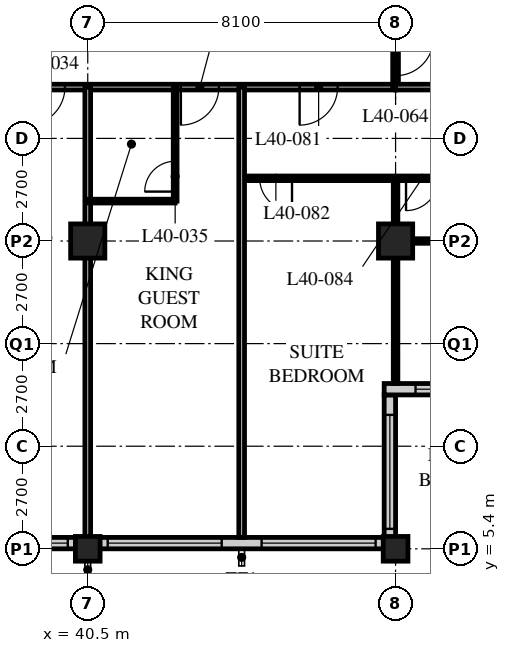
"""IFC4 building model, lengths in metres.
Left out: names, types, materials, properties, quantities, classifications, styles, units other than length and angle.
Written with IfcOpenShell. Run it as: python <this file> out.ifc"""

import sys

from ifc_helpers import new_model, si_unit, direction, frame, frame_2d, origin, origin_2d, place, context, subcontext, project, spatial, rectangle, hollow_rectangle, extrude, element, fill, save


model = new_model("IFC4")
c1 = context("Model", 3, precision=1e-05, world=origin(), true_north=direction((0.0, 1.0)))
c2 = subcontext(c1, "Body", "Model", "MODEL_VIEW")
j1 = project(units=[si_unit("LENGTHUNIT", "METRE"), si_unit("PLANEANGLEUNIT", "RADIAN")], contexts=[c1])
p1 = place(None, origin())
s1 = spatial("IfcSite", under=j1, at=p1, CompositionType="ELEMENT")
p2 = place(p1, origin())
s2 = spatial("IfcBuilding", under=s1, at=p2, CompositionType="ELEMENT")
p3 = place(p2, frame((0.0, 0.0, 154.4)))
s3 = spatial("IfcBuildingStorey", under=s2, at=p3, CompositionType="ELEMENT", Elevation=154.4)
p4 = place(p3, frame((40.5, 5.4, 0.0), z_axis=(0.0, 0.0, 1.0), x_axis=(1.0, 0.0, 0.0)))
e1 = element("IfcColumn", 1, at=p4, inside=s3, PredefinedType="COLUMN", context=c2, shape_type="SweptSolid", body=[
    extrude(hollow_rectangle(XDim=0.65, YDim=0.65, WallThickness=0.055, at=origin_2d()), origin(), (0.0, 0.0, 1.0), 3.4),
])
p5 = place(p3, frame((40.5, 13.5, 0.0), z_axis=(0.0, 0.0, 1.0), x_axis=(1.0, 0.0, 0.0)))
e2 = element("IfcColumn", 2, at=p5, inside=s3, PredefinedType="COLUMN", context=c2, shape_type="SweptSolid", body=[
    extrude(hollow_rectangle(XDim=0.9, YDim=0.9, WallThickness=0.1, at=origin_2d()), origin(), (0.0, 0.0, 1.0), 3.4),
])
p6 = place(p3, frame((48.6, 5.4, 0.0), z_axis=(0.0, 0.0, 1.0), x_axis=(1.0, 0.0, 0.0)))
e3 = element("IfcColumn", 3, at=p6, inside=s3, PredefinedType="COLUMN", context=c2, shape_type="SweptSolid", body=[
    extrude(hollow_rectangle(XDim=0.65, YDim=0.65, WallThickness=0.055, at=origin_2d()), origin(), (0.0, 0.0, 1.0), 3.4),
])
p7 = place(p3, frame((48.6, 13.5, 0.0), z_axis=(0.0, 0.0, 1.0), x_axis=(1.0, 0.0, 0.0)))
e4 = element("IfcColumn", 4, at=p7, inside=s3, PredefinedType="COLUMN", context=c2, shape_type="SweptSolid", body=[
    extrude(hollow_rectangle(XDim=0.9, YDim=0.9, WallThickness=0.1, at=origin_2d()), origin(), (0.0, 0.0, 1.0), 3.4),
])
p8 = place(p3, frame((8.4, 5.55, 0.0), z_axis=(0.0, 0.0, 1.0), x_axis=(1.0, 0.0, 0.0)))
e5 = element("IfcWall", 5, at=p8, inside=s3, PredefinedType="SOLIDWALL", context=c2, shape_type="SweptSolid", body=[
    extrude(rectangle(XDim=40.2, YDim=0.3, at=frame_2d((20.1, 0.0))), origin(), (0.0, 0.0, 1.0), 2.15),
])
p9 = place(p8, frame((0.225, 0.0, 0.9)))
e6 = element("IfcOpeningElement", 6, at=p9, cuts=e5, PredefinedType="OPENING", context=c2, shape_type="SweptSolid", body=[
    extrude(rectangle(XDim=3.0, YDim=1.2, at=frame_2d((1.5, 0.6))), frame((0.0, 0.16, 0.0), z_axis=(0.0, -1.0, 0.0), x_axis=(1.0, 0.0, 0.0)), (0.0, 0.0, 1.0), 0.32),
])
p10 = place(p8, frame((4.275, 0.0, 0.9)))
e7 = element("IfcOpeningElement", 7, at=p10, cuts=e5, PredefinedType="OPENING", context=c2, shape_type="SweptSolid", body=[
    extrude(rectangle(XDim=3.0, YDim=1.2, at=frame_2d((1.5, 0.6))), frame((0.0, 0.16, 0.0), z_axis=(0.0, -1.0, 0.0), x_axis=(1.0, 0.0, 0.0)), (0.0, 0.0, 1.0), 0.32),
])
p11 = place(p8, frame((8.325, 0.0, 0.9)))
e8 = element("IfcOpeningElement", 8, at=p11, cuts=e5, PredefinedType="OPENING", context=c2, shape_type="SweptSolid", body=[
    extrude(rectangle(XDim=3.0, YDim=1.2, at=frame_2d((1.5, 0.6))), frame((0.0, 0.16, 0.0), z_axis=(0.0, -1.0, 0.0), x_axis=(1.0, 0.0, 0.0)), (0.0, 0.0, 1.0), 0.32),
])
p12 = place(p8, frame((12.375, 0.0, 0.9)))
e9 = element("IfcOpeningElement", 9, at=p12, cuts=e5, PredefinedType="OPENING", context=c2, shape_type="SweptSolid", body=[
    extrude(rectangle(XDim=3.0, YDim=1.2, at=frame_2d((1.5, 0.6))), frame((0.0, 0.16, 0.0), z_axis=(0.0, -1.0, 0.0), x_axis=(1.0, 0.0, 0.0)), (0.0, 0.0, 1.0), 0.32),
])
p13 = place(p8, frame((16.425, 0.0, 0.9)))
e10 = element("IfcOpeningElement", 10, at=p13, cuts=e5, PredefinedType="OPENING", context=c2, shape_type="SweptSolid", body=[
    extrude(rectangle(XDim=3.0, YDim=1.2, at=frame_2d((1.5, 0.6))), frame((0.0, 0.16, 0.0), z_axis=(0.0, -1.0, 0.0), x_axis=(1.0, 0.0, 0.0)), (0.0, 0.0, 1.0), 0.32),
])
p14 = place(p8, frame((20.475, 0.0, 0.9)))
e11 = element("IfcOpeningElement", 11, at=p14, cuts=e5, PredefinedType="OPENING", context=c2, shape_type="SweptSolid", body=[
    extrude(rectangle(XDim=3.0, YDim=1.2, at=frame_2d((1.5, 0.6))), frame((0.0, 0.16, 0.0), z_axis=(0.0, -1.0, 0.0), x_axis=(1.0, 0.0, 0.0)), (0.0, 0.0, 1.0), 0.32),
])
p15 = place(p8, frame((24.525, 0.0, 0.9)))
e12 = element("IfcOpeningElement", 12, at=p15, cuts=e5, PredefinedType="OPENING", context=c2, shape_type="SweptSolid", body=[
    extrude(rectangle(XDim=3.0, YDim=1.2, at=frame_2d((1.5, 0.6))), frame((0.0, 0.16, 0.0), z_axis=(0.0, -1.0, 0.0), x_axis=(1.0, 0.0, 0.0)), (0.0, 0.0, 1.0), 0.32),
])
p16 = place(p8, frame((28.575, 0.0, 0.9)))
e13 = element("IfcOpeningElement", 13, at=p16, cuts=e5, PredefinedType="OPENING", context=c2, shape_type="SweptSolid", body=[
    extrude(rectangle(XDim=3.0, YDim=1.2, at=frame_2d((1.5, 0.6))), frame((0.0, 0.16, 0.0), z_axis=(0.0, -1.0, 0.0), x_axis=(1.0, 0.0, 0.0)), (0.0, 0.0, 1.0), 0.32),
])
p17 = place(p8, frame((32.625, 0.0, 0.9)))
e14 = element("IfcOpeningElement", 14, at=p17, cuts=e5, PredefinedType="OPENING", context=c2, shape_type="SweptSolid", body=[
    extrude(rectangle(XDim=3.0, YDim=1.2, at=frame_2d((1.5, 0.6))), frame((0.0, 0.16, 0.0), z_axis=(0.0, -1.0, 0.0), x_axis=(1.0, 0.0, 0.0)), (0.0, 0.0, 1.0), 0.32),
])
p18 = place(p8, frame((36.675, 0.0, 0.9)))
e15 = element("IfcOpeningElement", 15, at=p18, cuts=e5, PredefinedType="OPENING", context=c2, shape_type="SweptSolid", body=[
    extrude(rectangle(XDim=3.0, YDim=1.2, at=frame_2d((1.5, 0.6))), frame((0.0, 0.16, 0.0), z_axis=(0.0, -1.0, 0.0), x_axis=(1.0, 0.0, 0.0)), (0.0, 0.0, 1.0), 0.32),
])
p19 = place(p3, frame((48.45, 5.7, 0.0), z_axis=(0.0, 0.0, 1.0), x_axis=(0.0, 1.0, 0.0)))
e16 = element("IfcWall", 16, at=p19, inside=s3, PredefinedType="SOLIDWALL", context=c2, shape_type="SweptSolid", body=[
    extrude(rectangle(XDim=3.75, YDim=0.3, at=frame_2d((1.875, 0.0))), origin(), (0.0, 0.0, 1.0), 2.15),
])
p20 = place(p19, frame((0.225, 0.0, 0.9)))
e17 = element("IfcOpeningElement", 17, at=p20, cuts=e16, PredefinedType="OPENING", context=c2, shape_type="SweptSolid", body=[
    extrude(rectangle(XDim=3.0, YDim=1.2, at=frame_2d((1.5, 0.6))), frame((0.0, 0.16, 0.0), z_axis=(0.0, -1.0, 0.0), x_axis=(1.0, 0.0, 0.0)), (0.0, 0.0, 1.0), 0.32),
])
p21 = place(p3, frame((48.3, 9.6, 0.0), z_axis=(0.0, 0.0, 1.0), x_axis=(1.0, 0.0, 0.0)))
e18 = element("IfcWall", 18, at=p21, inside=s3, PredefinedType="SOLIDWALL", context=c2, shape_type="SweptSolid", body=[
    extrude(rectangle(XDim=4.35, YDim=0.3, at=frame_2d((2.175, 0.0))), origin(), (0.0, 0.0, 1.0), 2.45),
])
p22 = place(p21, frame((0.825, 0.0, 0.9)))
e19 = element("IfcOpeningElement", 19, at=p22, cuts=e18, PredefinedType="OPENING", context=c2, shape_type="SweptSolid", body=[
    extrude(rectangle(XDim=3.0, YDim=1.2, at=frame_2d((1.5, 0.6))), frame((0.0, 0.16, 0.0), z_axis=(0.0, -1.0, 0.0), x_axis=(1.0, 0.0, 0.0)), (0.0, 0.0, 1.0), 0.32),
])
p23 = place(p3, frame((8.1, 17.55, 0.0), z_axis=(0.0, 0.0, 1.0), x_axis=(1.0, 0.0, 0.0)))
e20 = element("IfcWall", 20, at=p23, inside=s3, PredefinedType="PARTITIONING", context=c2, shape_type="SweptSolid", body=[
    extrude(rectangle(XDim=40.5, YDim=0.15, at=frame_2d((20.25, 0.0))), origin(), (0.0, 0.0, 1.0), 3.15),
])
p24 = place(p23, frame((10.0, 0.0, 0.0)))
e21 = element("IfcOpeningElement", 21, at=p24, cuts=e20, PredefinedType="OPENING", context=c2, shape_type="SweptSolid", body=[
    extrude(rectangle(XDim=1.0, YDim=2.1, at=frame_2d((0.5, 1.05))), frame((0.0, 0.085, 0.0), z_axis=(0.0, -1.0, 0.0), x_axis=(1.0, 0.0, 0.0)), (0.0, 0.0, 1.0), 0.17),
])
p25 = place(p23, frame((22.15, 0.0, 0.0)))
e22 = element("IfcOpeningElement", 22, at=p25, cuts=e20, PredefinedType="OPENING", context=c2, shape_type="SweptSolid", body=[
    extrude(rectangle(XDim=1.0, YDim=2.1, at=frame_2d((0.5, 1.05))), frame((0.0, 0.085, 0.0), z_axis=(0.0, -1.0, 0.0), x_axis=(1.0, 0.0, 0.0)), (0.0, 0.0, 1.0), 0.17),
])
p26 = place(p23, frame((30.8, 0.0, 0.0)))
e23 = element("IfcOpeningElement", 23, at=p26, cuts=e20, PredefinedType="OPENING", context=c2, shape_type="SweptSolid", body=[
    extrude(rectangle(XDim=1.0, YDim=2.1, at=frame_2d((0.5, 1.05))), frame((0.0, 0.085, 0.0), z_axis=(0.0, -1.0, 0.0), x_axis=(1.0, 0.0, 0.0)), (0.0, 0.0, 1.0), 0.17),
])
p27 = place(p23, frame((34.85, 0.0, 0.0)))
e24 = element("IfcOpeningElement", 24, at=p27, cuts=e20, PredefinedType="OPENING", context=c2, shape_type="SweptSolid", body=[
    extrude(rectangle(XDim=1.0, YDim=2.1, at=frame_2d((0.5, 1.05))), frame((0.0, 0.085, 0.0), z_axis=(0.0, -1.0, 0.0), x_axis=(1.0, 0.0, 0.0)), (0.0, 0.0, 1.0), 0.17),
])
p28 = place(p23, frame((1.525, 0.0, 0.0)))
e25 = element("IfcOpeningElement", 25, at=p28, cuts=e20, PredefinedType="OPENING", context=c2, shape_type="SweptSolid", body=[
    extrude(rectangle(XDim=1.0, YDim=2.1, at=frame_2d((0.5, 1.05))), frame((0.0, 0.085, 0.0), z_axis=(0.0, -1.0, 0.0), x_axis=(1.0, 0.0, 0.0)), (0.0, 0.0, 1.0), 0.17),
])
p29 = place(p23, frame((37.975, 0.0, 0.0)))
e26 = element("IfcOpeningElement", 26, at=p29, cuts=e20, PredefinedType="OPENING", context=c2, shape_type="SweptSolid", body=[
    extrude(rectangle(XDim=1.0, YDim=2.1, at=frame_2d((0.5, 1.05))), frame((0.0, 0.085, 0.0), z_axis=(0.0, -1.0, 0.0), x_axis=(1.0, 0.0, 0.0)), (0.0, 0.0, 1.0), 0.17),
])
p30 = place(p3, frame((48.6, 17.55, 0.0), z_axis=(0.0, 0.0, 1.0), x_axis=(0.0, 1.0, 0.0)))
e27 = element("IfcWall", 27, at=p30, inside=s3, PredefinedType="PARTITIONING", context=c2, shape_type="SweptSolid", body=[
    extrude(rectangle(XDim=28.35, YDim=0.15, at=frame_2d((14.175, 0.0))), origin(), (0.0, 0.0, 1.0), 2.15),
])
p31 = place(p30, frame((0.3, 0.0, 0.0)))
e28 = element("IfcOpeningElement", 28, at=p31, cuts=e27, PredefinedType="OPENING", context=c2, shape_type="SweptSolid", body=[
    extrude(rectangle(XDim=1.0, YDim=2.1, at=frame_2d((0.5, 1.05))), frame((0.0, 0.085, 0.0), z_axis=(0.0, -1.0, 0.0), x_axis=(1.0, 0.0, 0.0)), (0.0, 0.0, 1.0), 0.17),
])
p32 = place(p30, frame((6.5, 0.0, 0.0)))
e29 = element("IfcOpeningElement", 29, at=p32, cuts=e27, PredefinedType="OPENING", context=c2, shape_type="SweptSolid", body=[
    extrude(rectangle(XDim=1.0, YDim=2.1, at=frame_2d((0.5, 1.05))), frame((0.0, 0.085, 0.0), z_axis=(0.0, -1.0, 0.0), x_axis=(1.0, 0.0, 0.0)), (0.0, 0.0, 1.0), 0.17),
])
p33 = place(p30, frame((13.675, 0.0, 0.0)))
e30 = element("IfcOpeningElement", 30, at=p33, cuts=e27, PredefinedType="OPENING", context=c2, shape_type="SweptSolid", body=[
    extrude(rectangle(XDim=1.0, YDim=2.1, at=frame_2d((0.5, 1.05))), frame((0.0, 0.085, 0.0), z_axis=(0.0, -1.0, 0.0), x_axis=(1.0, 0.0, 0.0)), (0.0, 0.0, 1.0), 0.17),
])
p34 = place(p30, frame((22.7, 0.0, 0.0)))
e31 = element("IfcOpeningElement", 31, at=p34, cuts=e27, PredefinedType="OPENING", context=c2, shape_type="SweptSolid", body=[
    extrude(rectangle(XDim=1.0, YDim=2.1, at=frame_2d((0.5, 1.05))), frame((0.0, 0.085, 0.0), z_axis=(0.0, -1.0, 0.0), x_axis=(1.0, 0.0, 0.0)), (0.0, 0.0, 1.0), 0.17),
])
p35 = place(p30, frame((24.9, 0.0, 0.0)))
e32 = element("IfcOpeningElement", 32, at=p35, cuts=e27, PredefinedType="OPENING", context=c2, shape_type="SweptSolid", body=[
    extrude(rectangle(XDim=1.0, YDim=2.1, at=frame_2d((0.5, 1.05))), frame((0.0, 0.085, 0.0), z_axis=(0.0, -1.0, 0.0), x_axis=(1.0, 0.0, 0.0)), (0.0, 0.0, 1.0), 0.17),
])
p36 = place(p3, frame((40.5, 17.55, 0.0), z_axis=(0.0, 0.0, 1.0), x_axis=(0.0, -1.0, 0.0)))
e33 = element("IfcWall", 33, at=p36, inside=s3, PredefinedType="PARTITIONING", context=c2, shape_type="SweptSolid", body=[
    extrude(rectangle(XDim=11.85, YDim=0.15, at=frame_2d((5.925, 0.0))), origin(), (0.0, 0.0, 1.0), 2.15),
])
p37 = place(p3, frame((40.5, 14.55, 0.0), z_axis=(0.0, 0.0, 1.0), x_axis=(1.0, 0.0, 0.0)))
e34 = element("IfcWall", 34, at=p37, inside=s3, PredefinedType="PARTITIONING", context=c2, shape_type="SweptSolid", body=[
    extrude(rectangle(XDim=2.3, YDim=0.1, at=frame_2d((1.15, 0.0))), origin(), (0.0, 0.0, 1.0), 3.15),
])
p38 = place(p3, frame((42.8, 17.55, 0.0), z_axis=(0.0, 0.0, 1.0), x_axis=(0.0, -1.0, 0.0)))
e35 = element("IfcWall", 35, at=p38, inside=s3, PredefinedType="PARTITIONING", context=c2, shape_type="SweptSolid", body=[
    extrude(rectangle(XDim=3.0, YDim=0.1, at=frame_2d((1.5, 0.0))), origin(), (0.0, 0.0, 1.0), 3.15),
])
p39 = place(p38, frame((1.95, 0.0, 0.0)))
e36 = element("IfcOpeningElement", 36, at=p39, cuts=e35, PredefinedType="OPENING", context=c2, shape_type="SweptSolid", body=[
    extrude(rectangle(XDim=0.8, YDim=2.1, at=frame_2d((0.4, 1.05))), frame((0.0, 0.06, 0.0), z_axis=(0.0, -1.0, 0.0), x_axis=(1.0, 0.0, 0.0)), (0.0, 0.0, 1.0), 0.12),
])
p40 = place(p3, frame((44.55, 15.15, 0.0), z_axis=(0.0, 0.0, 1.0), x_axis=(1.0, 0.0, 0.0)))
e37 = element("IfcWall", 37, at=p40, inside=s3, PredefinedType="PARTITIONING", context=c2, shape_type="SweptSolid", body=[
    extrude(rectangle(XDim=8.05, YDim=0.12, at=frame_2d((4.025, 0.0))), origin(), (0.0, 0.0, 1.0), 3.15),
])
p41 = place(p40, frame((0.475, 0.0, 0.0)))
e38 = element("IfcOpeningElement", 38, at=p41, cuts=e37, PredefinedType="OPENING", context=c2, shape_type="SweptSolid", body=[
    extrude(rectangle(XDim=0.85, YDim=2.1, at=frame_2d((0.425, 1.05))), frame((0.0, 0.07, 0.0), z_axis=(0.0, -1.0, 0.0), x_axis=(1.0, 0.0, 0.0)), (0.0, 0.0, 1.0), 0.14),
])
p42 = place(p40, frame((4.325, 0.0, 0.0)))
e39 = element("IfcOpeningElement", 39, at=p42, cuts=e37, PredefinedType="OPENING", context=c2, shape_type="SweptSolid", body=[
    extrude(rectangle(XDim=0.85, YDim=2.1, at=frame_2d((0.425, 1.05))), frame((0.0, 0.07, 0.0), z_axis=(0.0, -1.0, 0.0), x_axis=(1.0, 0.0, 0.0)), (0.0, 0.0, 1.0), 0.14),
])
p43 = place(p3, frame((48.6, 15.15, 0.0), z_axis=(0.0, 0.0, 1.0), x_axis=(0.0, -1.0, 0.0)))
e40 = element("IfcWall", 40, at=p43, inside=s3, PredefinedType="PARTITIONING", context=c2, shape_type="SweptSolid", body=[
    extrude(rectangle(XDim=5.4, YDim=0.12, at=frame_2d((2.7, 0.0))), origin(), (0.0, 0.0, 1.0), 2.15),
])
p44 = place(p3, frame((48.6, 13.5, 0.0), z_axis=(0.0, 0.0, 1.0), x_axis=(1.0, 0.0, 0.0)))
e41 = element("IfcWall", 41, at=p44, inside=s3, PredefinedType="PARTITIONING", context=c2, shape_type="SweptSolid", body=[
    extrude(rectangle(XDim=3.75, YDim=0.12, at=frame_2d((1.875, 0.0))), origin(), (0.0, 0.0, 1.0), 2.38),
])
p45 = place(p44, frame((1.875, 0.0, 0.0)))
e42 = element("IfcOpeningElement", 42, at=p45, cuts=e41, PredefinedType="OPENING", context=c2, shape_type="SweptSolid", body=[
    extrude(rectangle(XDim=0.85, YDim=2.1, at=frame_2d((0.425, 1.05))), frame((0.0, 0.07, 0.0), z_axis=(0.0, -1.0, 0.0), x_axis=(1.0, 0.0, 0.0)), (0.0, 0.0, 1.0), 0.14),
])
p46 = place(p3, frame((48.6, 17.55, 0.0), z_axis=(0.0, 0.0, 1.0), x_axis=(1.0, 0.0, 0.0)))
e43 = element("IfcWall", 43, at=p46, inside=s3, PredefinedType="PARTITIONING", context=c2, shape_type="SweptSolid", body=[
    extrude(rectangle(XDim=7.8, YDim=0.15, at=frame_2d((3.9, 0.0))), origin(), (0.0, 0.0, 1.0), 3.15),
])
p47 = place(p3, frame((44.55, 17.55, 0.0), z_axis=(0.0, 0.0, 1.0), x_axis=(0.0, -1.0, 0.0)))
e44 = element("IfcWall", 44, at=p47, inside=s3, PredefinedType="PARTITIONING", context=c2, shape_type="SweptSolid", body=[
    extrude(rectangle(XDim=11.85, YDim=0.15, at=frame_2d((5.925, 0.0))), origin(), (0.0, 0.0, 1.0), 3.15),
])
p48 = place(p16, origin())
e45 = element("IfcWindow", 45, at=p48, inside=s3, PartitioningType="SINGLE_PANEL", PredefinedType="WINDOW", context=c2, shape_type="SweptSolid", body=[
    extrude(rectangle(XDim=3.0, YDim=1.2, at=frame_2d((1.5, 0.6))), frame((0.0, 0.03, 0.0), z_axis=(0.0, -1.0, 0.0), x_axis=(1.0, 0.0, 0.0)), (0.0, 0.0, 1.0), 0.06),
])
fill(e13, e45)
p49 = place(p17, origin())
e46 = element("IfcWindow", 46, at=p49, inside=s3, PartitioningType="SINGLE_PANEL", PredefinedType="WINDOW", context=c2, shape_type="SweptSolid", body=[
    extrude(rectangle(XDim=3.0, YDim=1.2, at=frame_2d((1.5, 0.6))), frame((0.0, 0.03, 0.0), z_axis=(0.0, -1.0, 0.0), x_axis=(1.0, 0.0, 0.0)), (0.0, 0.0, 1.0), 0.06),
])
fill(e14, e46)
p50 = place(p18, origin())
e47 = element("IfcWindow", 47, at=p50, inside=s3, PartitioningType="SINGLE_PANEL", PredefinedType="WINDOW", context=c2, shape_type="SweptSolid", body=[
    extrude(rectangle(XDim=3.0, YDim=1.2, at=frame_2d((1.5, 0.6))), frame((0.0, 0.03, 0.0), z_axis=(0.0, -1.0, 0.0), x_axis=(1.0, 0.0, 0.0)), (0.0, 0.0, 1.0), 0.06),
])
fill(e15, e47)
p51 = place(p20, origin())
e48 = element("IfcWindow", 48, at=p51, inside=s3, PartitioningType="SINGLE_PANEL", PredefinedType="WINDOW", context=c2, shape_type="SweptSolid", body=[
    extrude(rectangle(XDim=3.0, YDim=1.2, at=frame_2d((1.5, 0.6))), frame((0.0, 0.03, 0.0), z_axis=(0.0, -1.0, 0.0), x_axis=(1.0, 0.0, 0.0)), (0.0, 0.0, 1.0), 0.06),
])
fill(e17, e48)
p52 = place(p22, origin())
e49 = element("IfcWindow", 49, at=p52, inside=s3, PartitioningType="SINGLE_PANEL", PredefinedType="WINDOW", context=c2, shape_type="SweptSolid", body=[
    extrude(rectangle(XDim=3.0, YDim=1.2, at=frame_2d((1.5, 0.6))), frame((0.0, 0.03, 0.0), z_axis=(0.0, -1.0, 0.0), x_axis=(1.0, 0.0, 0.0)), (0.0, 0.0, 1.0), 0.06),
])
fill(e19, e49)
p53 = place(p26, origin())
e50 = element("IfcDoor", 50, at=p53, inside=s3, OperationType="SINGLE_SWING_RIGHT", PredefinedType="DOOR", context=c2, shape_type="SweptSolid", body=[
    extrude(rectangle(XDim=1.0, YDim=2.1, at=frame_2d((0.5, 1.05))), frame((0.0, 0.025, 0.0), z_axis=(0.0, -1.0, 0.0), x_axis=(1.0, 0.0, 0.0)), (0.0, 0.0, 1.0), 0.05),
])
fill(e23, e50)
p54 = place(p39, origin())
e51 = element("IfcDoor", 51, at=p54, inside=s3, OperationType="SINGLE_SWING_LEFT", PredefinedType="DOOR", context=c2, shape_type="SweptSolid", body=[
    extrude(rectangle(XDim=0.8, YDim=2.1, at=frame_2d((0.4, 1.05))), frame((0.0, 0.025, 0.0), z_axis=(0.0, -1.0, 0.0), x_axis=(1.0, 0.0, 0.0)), (0.0, 0.0, 1.0), 0.05),
])
fill(e36, e51)
p55 = place(p27, origin())
e52 = element("IfcDoor", 52, at=p55, inside=s3, OperationType="SINGLE_SWING_RIGHT", PredefinedType="DOOR", context=c2, shape_type="SweptSolid", body=[
    extrude(rectangle(XDim=1.0, YDim=2.1, at=frame_2d((0.5, 1.05))), frame((0.0, 0.025, 0.0), z_axis=(0.0, -1.0, 0.0), x_axis=(1.0, 0.0, 0.0)), (0.0, 0.0, 1.0), 0.05),
])
fill(e24, e52)
p56 = place(p31, origin())
e53 = element("IfcDoor", 53, at=p56, inside=s3, OperationType="SINGLE_SWING_LEFT", PredefinedType="DOOR", context=c2, shape_type="SweptSolid", body=[
    extrude(rectangle(XDim=1.0, YDim=2.1, at=frame_2d((0.5, 1.05))), frame((0.0, 0.025, 0.0), z_axis=(0.0, -1.0, 0.0), x_axis=(1.0, 0.0, 0.0)), (0.0, 0.0, 1.0), 0.05),
])
fill(e28, e53)
p57 = place(p29, origin())
e54 = element("IfcDoor", 54, at=p57, inside=s3, OperationType="SINGLE_SWING_RIGHT", PredefinedType="DOOR", context=c2, shape_type="SweptSolid", body=[
    extrude(rectangle(XDim=1.0, YDim=2.1, at=frame_2d((0.5, 1.05))), frame((0.0, 0.025, 0.0), z_axis=(0.0, -1.0, 0.0), x_axis=(1.0, 0.0, 0.0)), (0.0, 0.0, 1.0), 0.05),
])
fill(e26, e54)
p58 = place(p41, origin())
e55 = element("IfcDoor", 55, at=p58, inside=s3, OperationType="SINGLE_SWING_LEFT", PredefinedType="DOOR", context=c2, shape_type="SweptSolid", body=[
    extrude(rectangle(XDim=0.85, YDim=2.1, at=frame_2d((0.425, 1.05))), frame((0.0, 0.025, 0.0), z_axis=(0.0, -1.0, 0.0), x_axis=(1.0, 0.0, 0.0)), (0.0, 0.0, 1.0), 0.05),
])
fill(e38, e55)
p59 = place(p42, origin())
e56 = element("IfcDoor", 56, at=p59, inside=s3, OperationType="SINGLE_SWING_RIGHT", PredefinedType="DOOR", context=c2, shape_type="SweptSolid", body=[
    extrude(rectangle(XDim=0.85, YDim=2.1, at=frame_2d((0.425, 1.05))), frame((0.0, 0.025, 0.0), z_axis=(0.0, -1.0, 0.0), x_axis=(1.0, 0.0, 0.0)), (0.0, 0.0, 1.0), 0.05),
])
fill(e39, e56)
save(model, sys.argv[1])
